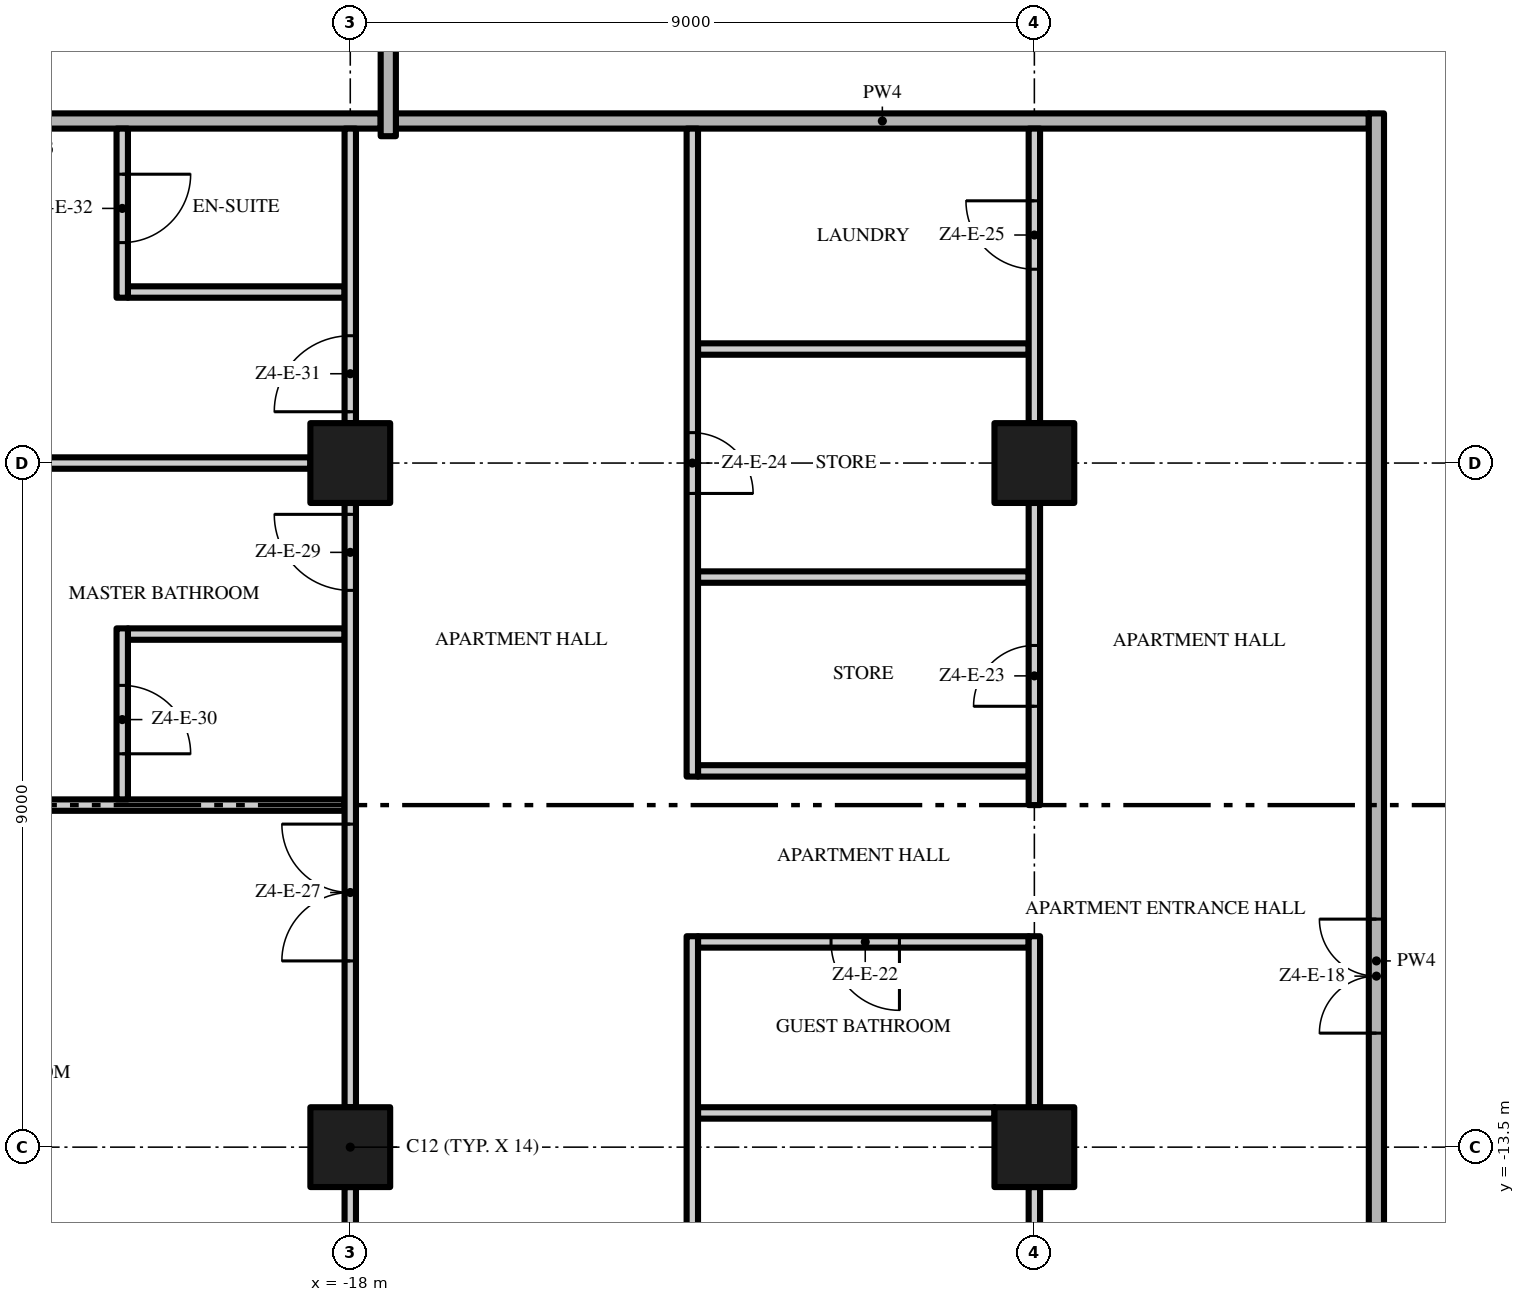
"""IFC4 building model, lengths in metres.
Left out: names, types, materials, properties, quantities, classifications, styles, units other than length and angle.
Written with IfcOpenShell. Run it as: python <this file> out.ifc"""

import sys

from ifc_helpers import new_model, si_unit, direction, frame, frame_2d, origin, origin_2d, place, context, subcontext, project, spatial, rectangle, extrude, element, fill, save


model = new_model("IFC4")
c1 = context("Model", 3, precision=1e-05, world=origin(), true_north=direction((0.0, 1.0)))
c2 = subcontext(c1, "Body", "Model", "MODEL_VIEW")
j1 = project(units=[si_unit("LENGTHUNIT", "METRE"), si_unit("PLANEANGLEUNIT", "RADIAN")], contexts=[c1])
p1 = place(None, origin())
s1 = spatial("IfcSite", under=j1, at=p1, CompositionType="ELEMENT")
p2 = place(p1, origin())
s2 = spatial("IfcBuilding", under=s1, at=p2, CompositionType="ELEMENT")
p3 = place(p2, frame((0.0, 0.0, 226.2)))
s3 = spatial("IfcBuildingStorey", under=s2, at=p3, CompositionType="ELEMENT", Elevation=226.2)
for number, where, z_axis, x_axis in (
    (1, (-18.0, -13.5, 0.0), (0.0, 0.0, 1.0), (1.0, 0.0, 0.0)),
    (2, (-18.0, -4.5, 0.0), (0.0, 0.0, 1.0), (1.0, 0.0, 0.0)),
    (3, (-9.0, -13.5, 0.0), (0.0, 0.0, 1.0), (1.0, 0.0, 0.0)),
    (4, (-9.0, -4.5, 0.0), (0.0, 0.0, 1.0), (1.0, 0.0, 0.0)),
):
    element("IfcColumn", number, at=place(p3, frame(where, z_axis=z_axis, x_axis=x_axis)), inside=s3, PredefinedType="COLUMN", context=c2, shape_type="SweptSolid", body=[
        extrude(rectangle(XDim=1.05, YDim=1.05, at=origin_2d()), origin(), (0.0, 0.0, 1.0), 3.5),
    ])
p4 = place(p3, frame((-13.425, -13.05, 0.0), z_axis=(0.0, 0.0, 1.0), x_axis=(1.0, 0.0, 0.0)))
e5 = element("IfcWall", 5, at=p4, inside=s3, PredefinedType="PARTITIONING", context=c2, shape_type="SweptSolid", body=[
    extrude(rectangle(XDim=3.9, YDim=0.15, at=frame_2d((1.95, 0.0))), origin(), (0.0, 0.0, 1.0), 3.5),
])
p5 = place(p3, frame((-9.075, -10.8, 0.0), z_axis=(0.0, 0.0, 1.0), x_axis=(-1.0, 0.0, 0.0)))
e6 = element("IfcWall", 6, at=p5, inside=s3, PredefinedType="PARTITIONING", context=c2, shape_type="SweptSolid", body=[
    extrude(rectangle(XDim=4.35, YDim=0.15, at=frame_2d((2.175, 0.0))), origin(), (0.0, 0.0, 1.0), 3.5),
])
p6 = place(p5, frame((1.7, 0.0, 0.0)))
e7 = element("IfcOpeningElement", 7, at=p6, cuts=e6, PredefinedType="OPENING", context=c2, shape_type="SweptSolid", body=[
    extrude(rectangle(XDim=0.9, YDim=2.1, at=frame_2d((0.45, 1.05))), frame((0.0, 0.085, 0.0), z_axis=(0.0, -1.0, 0.0), x_axis=(1.0, 0.0, 0.0)), (0.0, 0.0, 1.0), 0.17),
])
p7 = place(p3, frame((-26.7, -9.0, 0.0), z_axis=(0.0, 0.0, 1.0), x_axis=(1.0, 0.0, 0.0)))
e8 = element("IfcWall", 8, at=p7, inside=s3, PredefinedType="PARTITIONING", context=c2, shape_type="SweptSolid", body=[
    extrude(rectangle(XDim=8.625, YDim=0.15, at=frame_2d((4.312, 0.0))), origin(), (0.0, 0.0, 1.0), 3.5),
])
p8 = place(p3, frame((-13.425, -8.55, 0.0), z_axis=(0.0, 0.0, 1.0), x_axis=(1.0, 0.0, 0.0)))
e9 = element("IfcWall", 9, at=p8, inside=s3, PredefinedType="PARTITIONING", context=c2, shape_type="SweptSolid", body=[
    extrude(rectangle(XDim=4.35, YDim=0.15, at=frame_2d((2.175, 0.0))), origin(), (0.0, 0.0, 1.0), 3.5),
])
p9 = place(p3, frame((-20.925, -6.75, 0.0), z_axis=(0.0, 0.0, 1.0), x_axis=(1.0, 0.0, 0.0)))
e10 = element("IfcWall", 10, at=p9, inside=s3, PredefinedType="PARTITIONING", context=c2, shape_type="SweptSolid", body=[
    extrude(rectangle(XDim=2.85, YDim=0.15, at=frame_2d((1.425, 0.0))), origin(), (0.0, 0.0, 1.0), 3.5),
])
p10 = place(p3, frame((-13.425, -6.0, 0.0), z_axis=(0.0, 0.0, 1.0), x_axis=(1.0, 0.0, 0.0)))
e11 = element("IfcWall", 11, at=p10, inside=s3, PredefinedType="PARTITIONING", context=c2, shape_type="SweptSolid", body=[
    extrude(rectangle(XDim=4.35, YDim=0.15, at=frame_2d((2.175, 0.0))), origin(), (0.0, 0.0, 1.0), 3.5),
])
p11 = place(p3, frame((-26.05, -4.5, 0.0), z_axis=(0.0, 0.0, 1.0), x_axis=(1.0, 0.0, 0.0)))
e12 = element("IfcWall", 12, at=p11, inside=s3, PredefinedType="PARTITIONING", context=c2, shape_type="SweptSolid", body=[
    extrude(rectangle(XDim=7.525, YDim=0.15, at=frame_2d((3.763, 0.0))), origin(), (0.0, 0.0, 1.0), 3.5),
])
p12 = place(p3, frame((-13.425, -3.0, 0.0), z_axis=(0.0, 0.0, 1.0), x_axis=(1.0, 0.0, 0.0)))
e13 = element("IfcWall", 13, at=p12, inside=s3, PredefinedType="PARTITIONING", context=c2, shape_type="SweptSolid", body=[
    extrude(rectangle(XDim=4.35, YDim=0.15, at=frame_2d((2.175, 0.0))), origin(), (0.0, 0.0, 1.0), 3.5),
])
p13 = place(p3, frame((-20.925, -2.25, 0.0), z_axis=(0.0, 0.0, 1.0), x_axis=(1.0, 0.0, 0.0)))
e14 = element("IfcWall", 14, at=p13, inside=s3, PredefinedType="PARTITIONING", context=c2, shape_type="SweptSolid", body=[
    extrude(rectangle(XDim=2.85, YDim=0.15, at=frame_2d((1.425, 0.0))), origin(), (0.0, 0.0, 1.0), 3.5),
])
p14 = place(p3, frame((-17.4, 0.0, 0.0), z_axis=(0.0, 0.0, 1.0), x_axis=(1.0, 0.0, 0.0)))
e15 = element("IfcWall", 15, at=p14, inside=s3, PredefinedType="PARTITIONING", context=c2, shape_type="SweptSolid", body=[
    extrude(rectangle(XDim=12.8, YDim=0.2, at=frame_2d((6.4, 0.0))), origin(), (0.0, 0.0, 1.0), 3.5),
])
p15 = place(p3, frame((-26.7, 0.0, 0.0), z_axis=(0.0, 0.0, 1.0), x_axis=(1.0, 0.0, 0.0)))
e16 = element("IfcWall", 16, at=p15, inside=s3, PredefinedType="PARTITIONING", context=c2, shape_type="SweptSolid", body=[
    extrude(rectangle(XDim=9.1, YDim=0.2, at=frame_2d((4.55, 0.0))), origin(), (0.0, 0.0, 1.0), 3.5),
])
p16 = place(p3, frame((-21.0, -6.675, 0.0), z_axis=(0.0, 0.0, 1.0), x_axis=(0.0, -1.0, 0.0)))
e17 = element("IfcWall", 17, at=p16, inside=s3, PredefinedType="PARTITIONING", context=c2, shape_type="SweptSolid", body=[
    extrude(rectangle(XDim=2.25, YDim=0.15, at=frame_2d((1.125, 0.0))), origin(), (0.0, 0.0, 1.0), 3.5),
])
p17 = place(p16, frame((0.75, 0.0, 0.0)))
e18 = element("IfcOpeningElement", 18, at=p17, cuts=e17, PredefinedType="OPENING", context=c2, shape_type="SweptSolid", body=[
    extrude(rectangle(XDim=0.9, YDim=2.1, at=frame_2d((0.45, 1.05))), frame((0.0, 0.085, 0.0), z_axis=(0.0, -1.0, 0.0), x_axis=(1.0, 0.0, 0.0)), (0.0, 0.0, 1.0), 0.17),
])
p18 = place(p3, frame((-21.0, -0.1, 0.0), z_axis=(0.0, 0.0, 1.0), x_axis=(0.0, -1.0, 0.0)))
e19 = element("IfcWall", 19, at=p18, inside=s3, PredefinedType="PARTITIONING", context=c2, shape_type="SweptSolid", body=[
    extrude(rectangle(XDim=2.225, YDim=0.15, at=frame_2d((1.113, 0.0))), origin(), (0.0, 0.0, 1.0), 3.5),
])
p19 = place(p18, frame((0.6, 0.0, 0.0)))
e20 = element("IfcOpeningElement", 20, at=p19, cuts=e19, PredefinedType="OPENING", context=c2, shape_type="SweptSolid", body=[
    extrude(rectangle(XDim=0.9, YDim=2.1, at=frame_2d((0.45, 1.05))), frame((0.0, 0.085, 0.0), z_axis=(0.0, -1.0, 0.0), x_axis=(1.0, 0.0, 0.0)), (0.0, 0.0, 1.0), 0.17),
])
p20 = place(p3, frame((-18.0, -21.55, 0.0), z_axis=(0.0, 0.0, 1.0), x_axis=(0.0, 1.0, 0.0)))
e21 = element("IfcWall", 21, at=p20, inside=s3, PredefinedType="PARTITIONING", context=c2, shape_type="SweptSolid", body=[
    extrude(rectangle(XDim=7.525, YDim=0.15, at=frame_2d((3.763, 0.0))), origin(), (0.0, 0.0, 1.0), 3.5),
])
p21 = place(p20, frame((0.55, 0.0, 0.0)))
e22 = element("IfcOpeningElement", 22, at=p21, cuts=e21, PredefinedType="OPENING", context=c2, shape_type="SweptSolid", body=[
    extrude(rectangle(XDim=1.5, YDim=2.4, at=frame_2d((0.75, 1.2))), frame((0.0, 0.085, 0.0), z_axis=(0.0, -1.0, 0.0), x_axis=(1.0, 0.0, 0.0)), (0.0, 0.0, 1.0), 0.17),
])
p22 = place(p3, frame((-18.0, -12.975, 0.0), z_axis=(0.0, 0.0, 1.0), x_axis=(0.0, 1.0, 0.0)))
e23 = element("IfcWall", 23, at=p22, inside=s3, PredefinedType="PARTITIONING", context=c2, shape_type="SweptSolid", body=[
    extrude(rectangle(XDim=7.95, YDim=0.15, at=frame_2d((3.975, 0.0))), origin(), (0.0, 0.0, 1.0), 3.5),
])
p23 = place(p22, frame((1.925, 0.0, 0.0)))
e24 = element("IfcOpeningElement", 24, at=p23, cuts=e23, PredefinedType="OPENING", context=c2, shape_type="SweptSolid", body=[
    extrude(rectangle(XDim=1.8, YDim=2.4, at=frame_2d((0.9, 1.2))), frame((0.0, 0.085, 0.0), z_axis=(0.0, -1.0, 0.0), x_axis=(1.0, 0.0, 0.0)), (0.0, 0.0, 1.0), 0.17),
])
p24 = place(p22, frame((6.8, 0.0, 0.0)))
e25 = element("IfcOpeningElement", 25, at=p24, cuts=e23, PredefinedType="OPENING", context=c2, shape_type="SweptSolid", body=[
    extrude(rectangle(XDim=1.0, YDim=2.4, at=frame_2d((0.5, 1.2))), frame((0.0, 0.085, 0.0), z_axis=(0.0, -1.0, 0.0), x_axis=(1.0, 0.0, 0.0)), (0.0, 0.0, 1.0), 0.17),
])
p25 = place(p3, frame((-18.0, -3.975, 0.0), z_axis=(0.0, 0.0, 1.0), x_axis=(0.0, 1.0, 0.0)))
e26 = element("IfcWall", 26, at=p25, inside=s3, PredefinedType="PARTITIONING", context=c2, shape_type="SweptSolid", body=[
    extrude(rectangle(XDim=3.875, YDim=0.15, at=frame_2d((1.938, 0.0))), origin(), (0.0, 0.0, 1.0), 3.5),
])
p26 = place(p25, frame((0.15, 0.0, 0.0)))
e27 = element("IfcOpeningElement", 27, at=p26, cuts=e26, PredefinedType="OPENING", context=c2, shape_type="SweptSolid", body=[
    extrude(rectangle(XDim=1.0, YDim=2.4, at=frame_2d((0.5, 1.2))), frame((0.0, 0.085, 0.0), z_axis=(0.0, -1.0, 0.0), x_axis=(1.0, 0.0, 0.0)), (0.0, 0.0, 1.0), 0.17),
])
p27 = place(p3, frame((-17.5, -0.2, 0.0), z_axis=(0.0, 0.0, 1.0), x_axis=(0.0, 1.0, 0.0)))
e28 = element("IfcWall", 28, at=p27, inside=s3, PredefinedType="PARTITIONING", context=c2, shape_type="SweptSolid", body=[
    extrude(rectangle(XDim=4.175, YDim=0.2, at=frame_2d((2.087, 0.0))), origin(), (0.0, 0.0, 1.0), 3.5),
])
p28 = place(p3, frame((-13.5, -10.725, 0.0), z_axis=(0.0, 0.0, 1.0), x_axis=(0.0, -1.0, 0.0)))
e29 = element("IfcWall", 29, at=p28, inside=s3, PredefinedType="PARTITIONING", context=c2, shape_type="SweptSolid", body=[
    extrude(rectangle(XDim=11.475, YDim=0.15, at=frame_2d((5.737, 0.0))), origin(), (0.0, 0.0, 1.0), 3.5),
])
p29 = place(p28, frame((10.475, 0.0, 0.0)))
e30 = element("IfcOpeningElement", 30, at=p29, cuts=e29, PredefinedType="OPENING", context=c2, shape_type="SweptSolid", body=[
    extrude(rectangle(XDim=0.8, YDim=2.0, at=frame_2d((0.4, 1.0))), frame((0.0, 0.085, 0.0), z_axis=(0.0, -1.0, 0.0), x_axis=(1.0, 0.0, 0.0)), (0.0, 0.0, 1.0), 0.17),
])
p30 = place(p28, frame((4.825, 0.0, 0.0)))
e31 = element("IfcOpeningElement", 31, at=p30, cuts=e29, PredefinedType="OPENING", context=c2, shape_type="SweptSolid", body=[
    extrude(rectangle(XDim=1.0, YDim=2.4, at=frame_2d((0.5, 1.2))), frame((0.0, 0.085, 0.0), z_axis=(0.0, -1.0, 0.0), x_axis=(1.0, 0.0, 0.0)), (0.0, 0.0, 1.0), 0.17),
])
p31 = place(p3, frame((-13.5, -0.1, 0.0), z_axis=(0.0, 0.0, 1.0), x_axis=(0.0, -1.0, 0.0)))
e32 = element("IfcWall", 32, at=p31, inside=s3, PredefinedType="PARTITIONING", context=c2, shape_type="SweptSolid", body=[
    extrude(rectangle(XDim=8.525, YDim=0.15, at=frame_2d((4.263, 0.0))), origin(), (0.0, 0.0, 1.0), 3.5),
])
p32 = place(p31, frame((4.0, 0.0, 0.0)))
e33 = element("IfcOpeningElement", 33, at=p32, cuts=e32, PredefinedType="OPENING", context=c2, shape_type="SweptSolid", body=[
    extrude(rectangle(XDim=0.8, YDim=2.0, at=frame_2d((0.4, 1.0))), frame((0.0, 0.085, 0.0), z_axis=(0.0, -1.0, 0.0), x_axis=(1.0, 0.0, 0.0)), (0.0, 0.0, 1.0), 0.17),
])
p33 = place(p3, frame((-9.0, -21.55, 0.0), z_axis=(0.0, 0.0, 1.0), x_axis=(0.0, 1.0, 0.0)))
e34 = element("IfcWall", 34, at=p33, inside=s3, PredefinedType="PARTITIONING", context=c2, shape_type="SweptSolid", body=[
    extrude(rectangle(XDim=7.525, YDim=0.15, at=frame_2d((3.763, 0.0))), origin(), (0.0, 0.0, 1.0), 3.5),
])
p34 = place(p33, frame((1.25, 0.0, 0.0)))
e35 = element("IfcOpeningElement", 35, at=p34, cuts=e34, PredefinedType="OPENING", context=c2, shape_type="SweptSolid", body=[
    extrude(rectangle(XDim=0.8, YDim=2.0, at=frame_2d((0.4, 1.0))), frame((0.0, 0.085, 0.0), z_axis=(0.0, -1.0, 0.0), x_axis=(1.0, 0.0, 0.0)), (0.0, 0.0, 1.0), 0.17),
])
p35 = place(p3, frame((-9.0, -12.975, 0.0), z_axis=(0.0, 0.0, 1.0), x_axis=(0.0, 1.0, 0.0)))
e36 = element("IfcWall", 36, at=p35, inside=s3, PredefinedType="PARTITIONING", context=c2, shape_type="SweptSolid", body=[
    extrude(rectangle(XDim=2.25, YDim=0.15, at=frame_2d((1.125, 0.0))), origin(), (0.0, 0.0, 1.0), 3.5),
])
p36 = place(p3, frame((-9.0, -9.0, 0.0), z_axis=(0.0, 0.0, 1.0), x_axis=(0.0, 1.0, 0.0)))
e37 = element("IfcWall", 37, at=p36, inside=s3, PredefinedType="PARTITIONING", context=c2, shape_type="SweptSolid", body=[
    extrude(rectangle(XDim=3.975, YDim=0.15, at=frame_2d((1.988, 0.0))), origin(), (0.0, 0.0, 1.0), 3.5),
])
p37 = place(p36, frame((1.3, 0.0, 0.0)))
e38 = element("IfcOpeningElement", 38, at=p37, cuts=e37, PredefinedType="OPENING", context=c2, shape_type="SweptSolid", body=[
    extrude(rectangle(XDim=0.8, YDim=2.0, at=frame_2d((0.4, 1.0))), frame((0.0, 0.085, 0.0), z_axis=(0.0, -1.0, 0.0), x_axis=(1.0, 0.0, 0.0)), (0.0, 0.0, 1.0), 0.17),
])
p38 = place(p3, frame((-9.0, -3.975, 0.0), z_axis=(0.0, 0.0, 1.0), x_axis=(0.0, 1.0, 0.0)))
e39 = element("IfcWall", 39, at=p38, inside=s3, PredefinedType="PARTITIONING", context=c2, shape_type="SweptSolid", body=[
    extrude(rectangle(XDim=3.875, YDim=0.15, at=frame_2d((1.938, 0.0))), origin(), (0.0, 0.0, 1.0), 3.5),
])
p39 = place(p38, frame((2.025, 0.0, 0.0)))
e40 = element("IfcOpeningElement", 40, at=p39, cuts=e39, PredefinedType="OPENING", context=c2, shape_type="SweptSolid", body=[
    extrude(rectangle(XDim=0.9, YDim=2.1, at=frame_2d((0.45, 1.05))), frame((0.0, 0.085, 0.0), z_axis=(0.0, -1.0, 0.0), x_axis=(1.0, 0.0, 0.0)), (0.0, 0.0, 1.0), 0.17),
])
p40 = place(p3, frame((-4.5, -22.2, 0.0), z_axis=(0.0, 0.0, 1.0), x_axis=(0.0, 1.0, 0.0)))
e41 = element("IfcWall", 41, at=p40, inside=s3, PredefinedType="PARTITIONING", context=c2, shape_type="SweptSolid", body=[
    extrude(rectangle(XDim=22.3, YDim=0.2, at=frame_2d((11.15, 0.0))), origin(), (0.0, 0.0, 1.0), 3.5),
])
p41 = place(p40, frame((10.2, 0.0, 0.0)))
e42 = element("IfcOpeningElement", 42, at=p41, cuts=e41, PredefinedType="OPENING", context=c2, shape_type="SweptSolid", body=[
    extrude(rectangle(XDim=1.5, YDim=2.4, at=frame_2d((0.75, 1.2))), frame((0.0, 0.11, 0.0), z_axis=(0.0, -1.0, 0.0), x_axis=(1.0, 0.0, 0.0)), (0.0, 0.0, 1.0), 0.22),
])
p42 = place(p41, origin())
e43 = element("IfcDoor", 43, at=p42, inside=s3, OperationType="DOUBLE_DOOR_SINGLE_SWING", PredefinedType="DOOR", context=c2, shape_type="SweptSolid", body=[
    extrude(rectangle(XDim=1.5, YDim=2.4, at=frame_2d((0.75, 1.2))), frame((0.0, 0.025, 0.0), z_axis=(0.0, -1.0, 0.0), x_axis=(1.0, 0.0, 0.0)), (0.0, 0.0, 1.0), 0.05),
])
fill(e42, e43)
p43 = place(p6, origin())
e44 = element("IfcDoor", 44, at=p43, inside=s3, OperationType="SINGLE_SWING_LEFT", PredefinedType="DOOR", context=c2, shape_type="SweptSolid", body=[
    extrude(rectangle(XDim=0.9, YDim=2.1, at=frame_2d((0.45, 1.05))), frame((0.0, 0.025, 0.0), z_axis=(0.0, -1.0, 0.0), x_axis=(1.0, 0.0, 0.0)), (0.0, 0.0, 1.0), 0.05),
])
fill(e7, e44)
p44 = place(p37, origin())
e45 = element("IfcDoor", 45, at=p44, inside=s3, OperationType="SINGLE_SWING_LEFT", PredefinedType="DOOR", context=c2, shape_type="SweptSolid", body=[
    extrude(rectangle(XDim=0.8, YDim=2.0, at=frame_2d((0.4, 1.0))), frame((0.0, 0.025, 0.0), z_axis=(0.0, -1.0, 0.0), x_axis=(1.0, 0.0, 0.0)), (0.0, 0.0, 1.0), 0.05),
])
fill(e38, e45)
p45 = place(p32, origin())
e46 = element("IfcDoor", 46, at=p45, inside=s3, OperationType="SINGLE_SWING_RIGHT", PredefinedType="DOOR", context=c2, shape_type="SweptSolid", body=[
    extrude(rectangle(XDim=0.8, YDim=2.0, at=frame_2d((0.4, 1.0))), frame((0.0, 0.025, 0.0), z_axis=(0.0, -1.0, 0.0), x_axis=(1.0, 0.0, 0.0)), (0.0, 0.0, 1.0), 0.05),
])
fill(e33, e46)
p46 = place(p39, origin())
e47 = element("IfcDoor", 47, at=p46, inside=s3, OperationType="SINGLE_SWING_RIGHT", PredefinedType="DOOR", context=c2, shape_type="SweptSolid", body=[
    extrude(rectangle(XDim=0.9, YDim=2.1, at=frame_2d((0.45, 1.05))), frame((0.0, 0.025, 0.0), z_axis=(0.0, -1.0, 0.0), x_axis=(1.0, 0.0, 0.0)), (0.0, 0.0, 1.0), 0.05),
])
fill(e40, e47)
p47 = place(p23, origin())
e48 = element("IfcDoor", 48, at=p47, inside=s3, OperationType="DOUBLE_DOOR_SINGLE_SWING", PredefinedType="DOOR", context=c2, shape_type="SweptSolid", body=[
    extrude(rectangle(XDim=1.8, YDim=2.4, at=frame_2d((0.9, 1.2))), frame((0.0, 0.025, 0.0), z_axis=(0.0, -1.0, 0.0), x_axis=(1.0, 0.0, 0.0)), (0.0, 0.0, 1.0), 0.05),
])
fill(e24, e48)
p48 = place(p24, origin())
e49 = element("IfcDoor", 49, at=p48, inside=s3, OperationType="SINGLE_SWING_RIGHT", PredefinedType="DOOR", context=c2, shape_type="SweptSolid", body=[
    extrude(rectangle(XDim=1.0, YDim=2.4, at=frame_2d((0.5, 1.2))), frame((0.0, 0.025, 0.0), z_axis=(0.0, -1.0, 0.0), x_axis=(1.0, 0.0, 0.0)), (0.0, 0.0, 1.0), 0.05),
])
fill(e25, e49)
p49 = place(p17, origin())
e50 = element("IfcDoor", 50, at=p49, inside=s3, OperationType="SINGLE_SWING_RIGHT", PredefinedType="DOOR", context=c2, shape_type="SweptSolid", body=[
    extrude(rectangle(XDim=0.9, YDim=2.1, at=frame_2d((0.45, 1.05))), frame((0.0, 0.025, 0.0), z_axis=(0.0, -1.0, 0.0), x_axis=(1.0, 0.0, 0.0)), (0.0, 0.0, 1.0), 0.05),
])
fill(e18, e50)
p50 = place(p26, origin())
e51 = element("IfcDoor", 51, at=p50, inside=s3, OperationType="SINGLE_SWING_LEFT", PredefinedType="DOOR", context=c2, shape_type="SweptSolid", body=[
    extrude(rectangle(XDim=1.0, YDim=2.4, at=frame_2d((0.5, 1.2))), frame((0.0, 0.025, 0.0), z_axis=(0.0, -1.0, 0.0), x_axis=(1.0, 0.0, 0.0)), (0.0, 0.0, 1.0), 0.05),
])
fill(e27, e51)
p51 = place(p19, origin())
e52 = element("IfcDoor", 52, at=p51, inside=s3, OperationType="SINGLE_SWING_LEFT", PredefinedType="DOOR", context=c2, shape_type="SweptSolid", body=[
    extrude(rectangle(XDim=0.9, YDim=2.1, at=frame_2d((0.45, 1.05))), frame((0.0, 0.025, 0.0), z_axis=(0.0, -1.0, 0.0), x_axis=(1.0, 0.0, 0.0)), (0.0, 0.0, 1.0), 0.05),
])
fill(e20, e52)
save(model, sys.argv[1])
